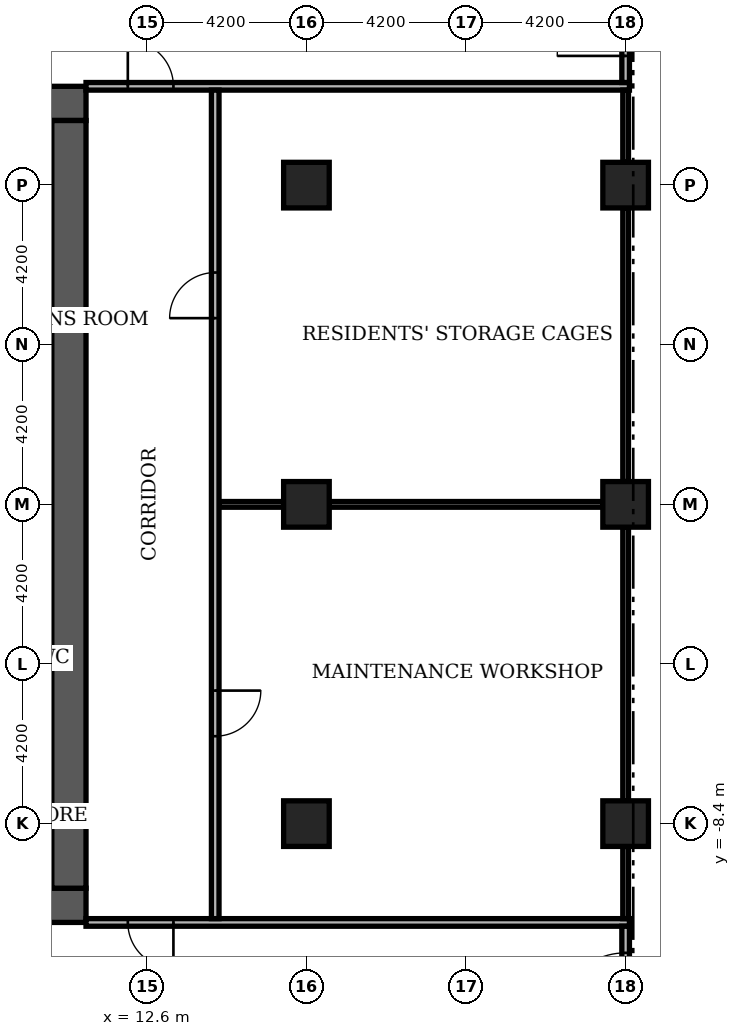
"""IFC4 building model, lengths in metres.
Left out: names, types, materials, properties, quantities, classifications, styles, units other than length and angle.
Written with IfcOpenShell. Run it as: python <this file> out.ifc"""

import sys

from ifc_helpers import new_model, si_unit, direction, frame, frame_2d, origin, origin_2d, place, context, subcontext, project, spatial, rectangle, extrude, element, fill, save


model = new_model("IFC4")
c1 = context("Model", 3, precision=1e-05, world=origin(), true_north=direction((0.0, 1.0)))
c2 = subcontext(c1, "Body", "Model", "MODEL_VIEW")
j1 = project(units=[si_unit("LENGTHUNIT", "METRE"), si_unit("PLANEANGLEUNIT", "RADIAN")], contexts=[c1])
p1 = place(None, origin())
s1 = spatial("IfcSite", under=j1, at=p1, CompositionType="ELEMENT")
p2 = place(p1, origin())
s2 = spatial("IfcBuilding", under=s1, at=p2, CompositionType="ELEMENT")
p3 = place(p2, frame((0.0, 0.0, -8.4)))
s3 = spatial("IfcBuildingStorey", under=s2, at=p3, CompositionType="ELEMENT", Elevation=-8.4)
for number, where, z_axis, x_axis in (
    (1, (9.2, -3.0, 0.0), (0.0, 0.0, 1.0), (1.0, 0.0, 0.0)),
    (2, (9.2, 2.4, 0.0), (0.0, 0.0, 1.0), (1.0, 0.0, 0.0)),
):
    element("IfcWall", number, at=place(p3, frame(where, z_axis=z_axis, x_axis=x_axis)), inside=s3, PredefinedType="SHEAR", context=c2, shape_type="SweptSolid", body=[
        extrude(rectangle(XDim=0.9, YDim=0.2, at=frame_2d((0.45, 0.0))), origin(), (0.0, 0.0, 1.0), 3.85),
    ])
p4 = place(p3, frame((-11.0, -10.55, 0.0), z_axis=(0.0, 0.0, 1.0), x_axis=(1.0, 0.0, 0.0)))
e3 = element("IfcWall", 3, at=p4, inside=s3, PredefinedType="SHEAR", context=c2, shape_type="SweptSolid", body=[
    extrude(rectangle(XDim=22.0, YDim=0.9, at=frame_2d((11.0, 0.0))), origin(), (0.0, 0.0, 1.0), 3.85),
])
p5 = place(p4, frame((7.4, 0.0, 0.0)))
e4 = element("IfcOpeningElement", 4, at=p5, cuts=e3, PredefinedType="OPENING", context=c2, shape_type="SweptSolid", body=[
    extrude(rectangle(XDim=1.8, YDim=2.2, at=frame_2d((0.9, 1.1))), frame((0.0, 0.46, 0.0), z_axis=(0.0, -1.0, 0.0), x_axis=(1.0, 0.0, 0.0)), (0.0, 0.0, 1.0), 0.92),
])
p6 = place(p3, frame((-11.0, 10.55, 0.0), z_axis=(0.0, 0.0, 1.0), x_axis=(1.0, 0.0, 0.0)))
e5 = element("IfcWall", 5, at=p6, inside=s3, PredefinedType="SHEAR", context=c2, shape_type="SweptSolid", body=[
    extrude(rectangle(XDim=22.0, YDim=0.9, at=frame_2d((11.0, 0.0))), origin(), (0.0, 0.0, 1.0), 3.85),
])
p7 = place(p6, frame((13.3, 0.0, 0.0)))
e6 = element("IfcOpeningElement", 6, at=p7, cuts=e5, PredefinedType="OPENING", context=c2, shape_type="SweptSolid", body=[
    extrude(rectangle(XDim=1.8, YDim=2.2, at=frame_2d((0.9, 1.1))), frame((0.0, 0.46, 0.0), z_axis=(0.0, -1.0, 0.0), x_axis=(1.0, 0.0, 0.0)), (0.0, 0.0, 1.0), 0.92),
])
p8 = place(p3, frame((10.55, -10.1, 0.0), z_axis=(0.0, 0.0, 1.0), x_axis=(0.0, 1.0, 0.0)))
e7 = element("IfcWall", 7, at=p8, inside=s3, PredefinedType="SHEAR", context=c2, shape_type="SweptSolid", body=[
    extrude(rectangle(XDim=20.2, YDim=0.9, at=frame_2d((10.1, 0.0))), origin(), (0.0, 0.0, 1.0), 3.85),
])
for number, where, z_axis, x_axis in (
    (8, (25.2, 0.0, 0.0), (0.0, 0.0, 1.0), (1.0, 0.0, 0.0)),
    (9, (25.2, 8.4, 0.0), (0.0, 0.0, 1.0), (1.0, 0.0, 0.0)),
    (10, (25.2, -8.4, 0.0), (0.0, 0.0, 1.0), (1.0, 0.0, 0.0)),
    (11, (16.8, 0.0, 0.0), (0.0, 0.0, 1.0), (1.0, 0.0, 0.0)),
    (12, (16.8, 8.4, 0.0), (0.0, 0.0, 1.0), (1.0, 0.0, 0.0)),
    (13, (16.8, -8.4, 0.0), (0.0, 0.0, 1.0), (1.0, 0.0, 0.0)),
):
    element("IfcColumn", number, at=place(p3, frame(where, z_axis=z_axis, x_axis=x_axis)), inside=s3, PredefinedType="COLUMN", context=c2, shape_type="SweptSolid", body=[
        extrude(rectangle(XDim=1.2, YDim=1.2, at=origin_2d()), origin(), (0.0, 0.0, 1.0), 4.2),
    ])
p9 = place(p3, frame((11.0, -11.0, 0.0), z_axis=(0.0, 0.0, 1.0), x_axis=(1.0, 0.0, 0.0)))
e14 = element("IfcWall", 14, at=p9, inside=s3, PredefinedType="PARTITIONING", context=c2, shape_type="SweptSolid", body=[
    extrude(rectangle(XDim=14.3, YDim=0.2, at=frame_2d((7.15, 0.0))), origin(), (0.0, 0.0, 1.0), 3.85),
])
p10 = place(p9, frame((1.1, 0.0, 0.0)))
e15 = element("IfcOpeningElement", 15, at=p10, cuts=e14, PredefinedType="OPENING", context=c2, shape_type="SweptSolid", body=[
    extrude(rectangle(XDim=1.2, YDim=2.2, at=frame_2d((0.6, 1.1))), frame((0.0, 0.11, 0.0), z_axis=(0.0, -1.0, 0.0), x_axis=(1.0, 0.0, 0.0)), (0.0, 0.0, 1.0), 0.22),
])
p11 = place(p3, frame((14.5, 0.0, 0.0), z_axis=(0.0, 0.0, 1.0), x_axis=(1.0, 0.0, 0.0)))
e16 = element("IfcWall", 16, at=p11, inside=s3, PredefinedType="PARTITIONING", context=c2, shape_type="SweptSolid", body=[
    extrude(rectangle(XDim=1.7, YDim=0.15, at=frame_2d((0.85, 0.0))), origin(), (0.0, 0.0, 1.0), 3.85),
])
p12 = place(p3, frame((17.4, 0.0, 0.0), z_axis=(0.0, 0.0, 1.0), x_axis=(1.0, 0.0, 0.0)))
e17 = element("IfcWall", 17, at=p12, inside=s3, PredefinedType="PARTITIONING", context=c2, shape_type="SweptSolid", body=[
    extrude(rectangle(XDim=7.2, YDim=0.15, at=frame_2d((3.6, 0.0))), origin(), (0.0, 0.0, 1.0), 3.85),
])
p13 = place(p3, frame((11.0, 11.0, 0.0), z_axis=(0.0, 0.0, 1.0), x_axis=(1.0, 0.0, 0.0)))
e18 = element("IfcWall", 18, at=p13, inside=s3, PredefinedType="PARTITIONING", context=c2, shape_type="SweptSolid", body=[
    extrude(rectangle(XDim=14.3, YDim=0.2, at=frame_2d((7.15, 0.0))), origin(), (0.0, 0.0, 1.0), 3.85),
])
p14 = place(p13, frame((1.1, 0.0, 0.0)))
e19 = element("IfcOpeningElement", 19, at=p14, cuts=e18, PredefinedType="OPENING", context=c2, shape_type="SweptSolid", body=[
    extrude(rectangle(XDim=1.2, YDim=2.2, at=frame_2d((0.6, 1.1))), frame((0.0, 0.11, 0.0), z_axis=(0.0, -1.0, 0.0), x_axis=(1.0, 0.0, 0.0)), (0.0, 0.0, 1.0), 0.22),
])
p15 = place(p3, frame((14.4, -10.9, 0.0), z_axis=(0.0, 0.0, 1.0), x_axis=(0.0, 1.0, 0.0)))
e20 = element("IfcWall", 20, at=p15, inside=s3, PredefinedType="PARTITIONING", context=c2, shape_type="SweptSolid", body=[
    extrude(rectangle(XDim=21.8, YDim=0.2, at=frame_2d((10.9, 0.0))), origin(), (0.0, 0.0, 1.0), 3.85),
])
p16 = place(p15, frame((4.8, 0.0, 0.0)))
e21 = element("IfcOpeningElement", 21, at=p16, cuts=e20, PredefinedType="OPENING", context=c2, shape_type="SweptSolid", body=[
    extrude(rectangle(XDim=1.2, YDim=2.2, at=frame_2d((0.6, 1.1))), frame((0.0, 0.11, 0.0), z_axis=(0.0, -1.0, 0.0), x_axis=(1.0, 0.0, 0.0)), (0.0, 0.0, 1.0), 0.22),
])
p17 = place(p15, frame((15.8, 0.0, 0.0)))
e22 = element("IfcOpeningElement", 22, at=p17, cuts=e20, PredefinedType="OPENING", context=c2, shape_type="SweptSolid", body=[
    extrude(rectangle(XDim=1.2, YDim=2.2, at=frame_2d((0.6, 1.1))), frame((0.0, 0.11, 0.0), z_axis=(0.0, -1.0, 0.0), x_axis=(1.0, 0.0, 0.0)), (0.0, 0.0, 1.0), 0.22),
])
p18 = place(p3, frame((25.2, -14.3, 0.0), z_axis=(0.0, 0.0, 1.0), x_axis=(0.0, 1.0, 0.0)))
e23 = element("IfcWall", 23, at=p18, inside=s3, PredefinedType="PARTITIONING", context=c2, shape_type="SweptSolid", body=[
    extrude(rectangle(XDim=3.2, YDim=0.2, at=frame_2d((1.6, 0.0))), origin(), (0.0, 0.0, 1.0), 3.85),
])
p19 = place(p18, frame((0.7, 0.0, 0.0)))
e24 = element("IfcOpeningElement", 24, at=p19, cuts=e23, PredefinedType="OPENING", context=c2, shape_type="SweptSolid", body=[
    extrude(rectangle(XDim=1.8, YDim=2.2, at=frame_2d((0.9, 1.1))), frame((0.0, 0.11, 0.0), z_axis=(0.0, -1.0, 0.0), x_axis=(1.0, 0.0, 0.0)), (0.0, 0.0, 1.0), 0.22),
])
p20 = place(p3, frame((25.2, -10.9, 0.0), z_axis=(0.0, 0.0, 1.0), x_axis=(0.0, 1.0, 0.0)))
e25 = element("IfcWall", 25, at=p20, inside=s3, PredefinedType="PARTITIONING", context=c2, shape_type="SweptSolid", body=[
    extrude(rectangle(XDim=1.9, YDim=0.15, at=frame_2d((0.95, 0.0))), origin(), (0.0, 0.0, 1.0), 3.85),
])
for number, where, z_axis, x_axis in (
    (26, (25.2, -7.8, 0.0), (0.0, 0.0, 1.0), (0.0, 1.0, 0.0)),
    (27, (25.2, 0.6, 0.0), (0.0, 0.0, 1.0), (0.0, 1.0, 0.0)),
):
    element("IfcWall", number, at=place(p3, frame(where, z_axis=z_axis, x_axis=x_axis)), inside=s3, PredefinedType="PARTITIONING", context=c2, shape_type="SweptSolid", body=[
        extrude(rectangle(XDim=7.2, YDim=0.15, at=frame_2d((3.6, 0.0))), origin(), (0.0, 0.0, 1.0), 3.85),
    ])
p21 = place(p3, frame((25.2, 9.0, 0.0), z_axis=(0.0, 0.0, 1.0), x_axis=(0.0, 1.0, 0.0)))
e28 = element("IfcWall", 28, at=p21, inside=s3, PredefinedType="PARTITIONING", context=c2, shape_type="SweptSolid", body=[
    extrude(rectangle(XDim=1.9, YDim=0.15, at=frame_2d((0.95, 0.0))), origin(), (0.0, 0.0, 1.0), 3.85),
])
p22 = place(p3, frame((25.2, 11.1, 0.0), z_axis=(0.0, 0.0, 1.0), x_axis=(0.0, 1.0, 0.0)))
e29 = element("IfcWall", 29, at=p22, inside=s3, PredefinedType="PARTITIONING", context=c2, shape_type="SweptSolid", body=[
    extrude(rectangle(XDim=3.2, YDim=0.2, at=frame_2d((1.6, 0.0))), origin(), (0.0, 0.0, 1.0), 3.85),
])
p23 = place(p22, frame((0.7, 0.0, 0.0)))
e30 = element("IfcOpeningElement", 30, at=p23, cuts=e29, PredefinedType="OPENING", context=c2, shape_type="SweptSolid", body=[
    extrude(rectangle(XDim=1.8, YDim=2.2, at=frame_2d((0.9, 1.1))), frame((0.0, 0.11, 0.0), z_axis=(0.0, -1.0, 0.0), x_axis=(1.0, 0.0, 0.0)), (0.0, 0.0, 1.0), 0.22),
])
p24 = place(p19, origin())
e31 = element("IfcDoor", 31, at=p24, inside=s3, OperationType="DOUBLE_DOOR_SINGLE_SWING", PredefinedType="DOOR", context=c2, shape_type="SweptSolid", body=[
    extrude(rectangle(XDim=1.8, YDim=2.2, at=frame_2d((0.9, 1.1))), frame((0.0, 0.025, 0.0), z_axis=(0.0, -1.0, 0.0), x_axis=(1.0, 0.0, 0.0)), (0.0, 0.0, 1.0), 0.05),
])
fill(e24, e31)
p25 = place(p10, origin())
e32 = element("IfcDoor", 32, at=p25, inside=s3, OperationType="SINGLE_SWING_RIGHT", PredefinedType="DOOR", context=c2, shape_type="SweptSolid", body=[
    extrude(rectangle(XDim=1.2, YDim=2.2, at=frame_2d((0.6, 1.1))), frame((0.0, 0.025, 0.0), z_axis=(0.0, -1.0, 0.0), x_axis=(1.0, 0.0, 0.0)), (0.0, 0.0, 1.0), 0.05),
])
fill(e15, e32)
p26 = place(p16, origin())
e33 = element("IfcDoor", 33, at=p26, inside=s3, OperationType="SINGLE_SWING_RIGHT", PredefinedType="DOOR", context=c2, shape_type="SweptSolid", body=[
    extrude(rectangle(XDim=1.2, YDim=2.2, at=frame_2d((0.6, 1.1))), frame((0.0, 0.025, 0.0), z_axis=(0.0, -1.0, 0.0), x_axis=(1.0, 0.0, 0.0)), (0.0, 0.0, 1.0), 0.05),
])
fill(e21, e33)
p27 = place(p17, origin())
e34 = element("IfcDoor", 34, at=p27, inside=s3, OperationType="SINGLE_SWING_LEFT", PredefinedType="DOOR", context=c2, shape_type="SweptSolid", body=[
    extrude(rectangle(XDim=1.2, YDim=2.2, at=frame_2d((0.6, 1.1))), frame((0.0, 0.025, 0.0), z_axis=(0.0, -1.0, 0.0), x_axis=(1.0, 0.0, 0.0)), (0.0, 0.0, 1.0), 0.05),
])
fill(e22, e34)
p28 = place(p14, origin())
e35 = element("IfcDoor", 35, at=p28, inside=s3, OperationType="SINGLE_SWING_LEFT", PredefinedType="DOOR", context=c2, shape_type="SweptSolid", body=[
    extrude(rectangle(XDim=1.2, YDim=2.2, at=frame_2d((0.6, 1.1))), frame((0.0, 0.025, 0.0), z_axis=(0.0, -1.0, 0.0), x_axis=(1.0, 0.0, 0.0)), (0.0, 0.0, 1.0), 0.05),
])
fill(e19, e35)
p29 = place(p23, origin())
e36 = element("IfcDoor", 36, at=p29, inside=s3, OperationType="DOUBLE_DOOR_SINGLE_SWING", PredefinedType="DOOR", context=c2, shape_type="SweptSolid", body=[
    extrude(rectangle(XDim=1.8, YDim=2.2, at=frame_2d((0.9, 1.1))), frame((0.0, 0.025, 0.0), z_axis=(0.0, -1.0, 0.0), x_axis=(1.0, 0.0, 0.0)), (0.0, 0.0, 1.0), 0.05),
])
fill(e30, e36)
save(model, sys.argv[1])
